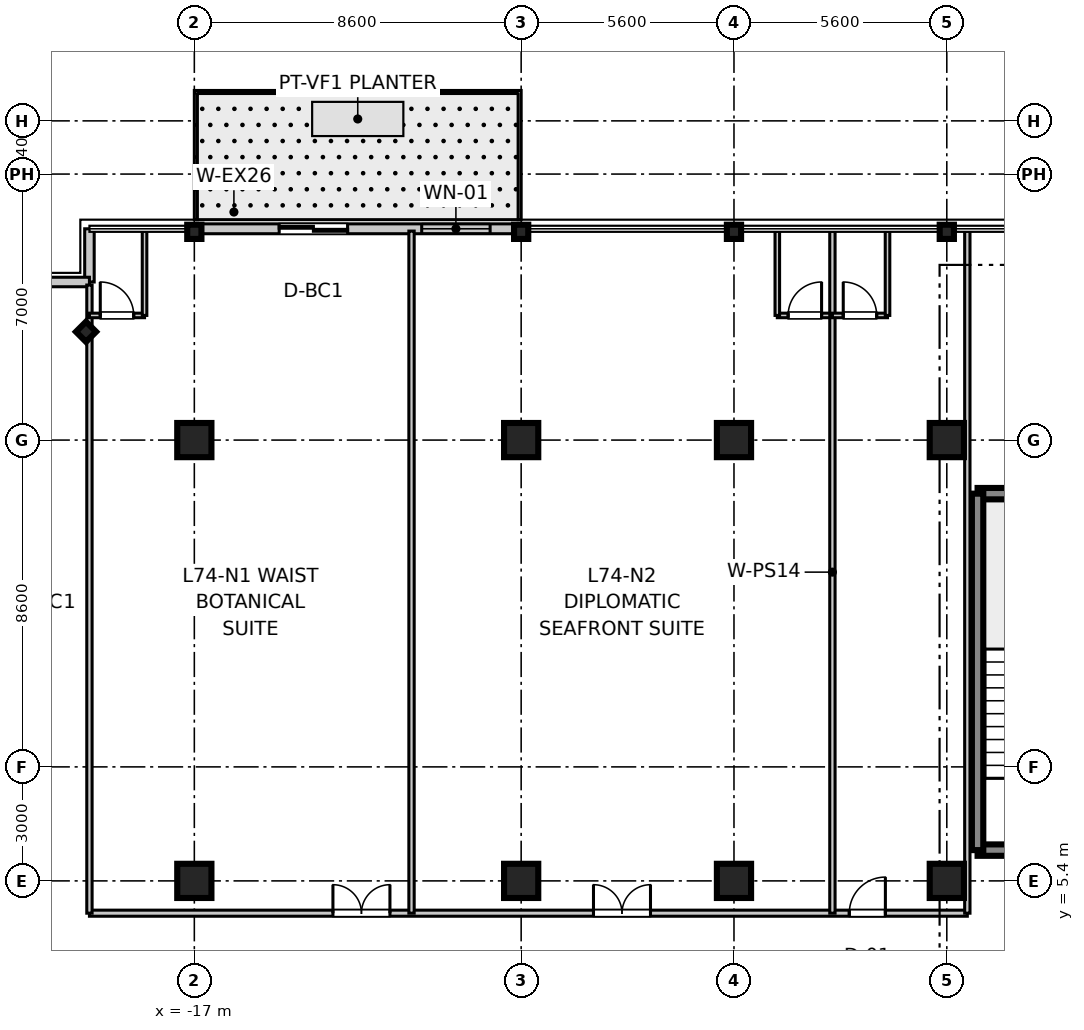
"""IFC4 building model, lengths in metres.
Left out: names, types, materials, properties, quantities, classifications, styles, units other than length and angle.
Written with IfcOpenShell. Run it as: python <this file> out.ifc"""

import sys

from ifc_helpers import new_model, si_unit, direction, frame, frame_2d, origin, origin_2d, place, context, subcontext, project, spatial, rectangle, i_section, extrude, source, transform, mapped, element, fill, save


model = new_model("IFC4")
c1 = context("Model", 3, precision=1e-05, world=origin(), true_north=direction((0.0, 1.0)))
c2 = subcontext(c1, "Body", "Model", "MODEL_VIEW")
j1 = project(units=[si_unit("LENGTHUNIT", "METRE"), si_unit("PLANEANGLEUNIT", "RADIAN")], contexts=[c1])
p1 = place(None, origin())
s1 = spatial("IfcSite", under=j1, at=p1, CompositionType="ELEMENT")
p2 = place(p1, origin())
s2 = spatial("IfcBuilding", under=s1, at=p2, CompositionType="ELEMENT")
p3 = place(p2, frame((0.0, 0.0, 288.8)))
s3 = spatial("IfcBuildingStorey", under=s2, at=p3, CompositionType="ELEMENT", Elevation=288.8)
m1 = source(origin(), c2, "Body", "SweptSolid", [
    extrude(rectangle(XDim=0.9, YDim=0.9, at=origin_2d()), origin(), (0.0, 0.0, 1.0), 3.805),
])
for number, where, z_axis, x_axis in (
    (1, (-17.0, 5.4, 0.0), (0.0, 0.0, 1.0), (1.0, 0.0, 0.0)),
    (2, (-17.0, 17.0, 0.0), (0.0, 0.0, 1.0), (1.0, 0.0, 0.0)),
    (3, (-8.4, 5.4, 0.0), (0.0, 0.0, 1.0), (1.0, 0.0, 0.0)),
    (4, (-8.4, 17.0, 0.0), (0.0, 0.0, 1.0), (1.0, 0.0, 0.0)),
    (5, (-2.8, 5.4, 0.0), (0.0, 0.0, 1.0), (1.0, 0.0, 0.0)),
    (6, (-2.8, 17.0, 0.0), (0.0, 0.0, 1.0), (1.0, 0.0, 0.0)),
    (7, (2.8, 5.4, 0.0), (0.0, 0.0, 1.0), (1.0, 0.0, 0.0)),
    (8, (2.8, 17.0, 0.0), (0.0, 0.0, 1.0), (1.0, 0.0, 0.0)),
):
    element("IfcColumn", number, at=place(p3, frame(where, z_axis=z_axis, x_axis=x_axis)), inside=s3, PredefinedType="COLUMN", context=c2, shape_type="MappedRepresentation", body=[
        mapped(m1, transform((0.0, 0.0, 0.0), scale=1.0)),
    ])
m2 = source(origin(), c2, "Body", "SweptSolid", [
    extrude(i_section(OverallWidth=0.374, OverallDepth=0.374, WebThickness=0.014, FlangeThickness=0.023, at=origin_2d()), origin(), (0.0, 0.0, 1.0), 3.805),
])
for number, where, z_axis, x_axis in (
    (9, (-17.0, 22.48, 0.0), (0.0, 0.0, 1.0), (0.0, 1.0, 0.0)),
    (10, (-8.4, 22.48, 0.0), (0.0, 0.0, 1.0), (0.0, 1.0, 0.0)),
    (11, (-2.8, 22.48, 0.0), (0.0, 0.0, 1.0), (0.0, 1.0, 0.0)),
    (12, (2.8, 22.48, 0.0), (0.0, 0.0, 1.0), (0.0, 1.0, 0.0)),
    (13, (-19.85, 19.85, 0.0), (0.0, 0.0, 1.0), (0.707, 0.707, 0.0)),
):
    element("IfcColumn", number, at=place(p3, frame(where, z_axis=z_axis, x_axis=x_axis)), inside=s3, PredefinedType="COLUMN", context=c2, shape_type="MappedRepresentation", body=[
        mapped(m2, transform((0.0, 0.0, 0.0), scale=1.0)),
    ])
m3 = source(origin(), c2, "Body", "SweptSolid", [
    extrude(rectangle(XDim=3.98, YDim=0.3, at=frame_2d((1.99, 0.0))), origin(), (0.0, 0.0, 1.0), 3.55),
])
for number, where, z_axis, x_axis in (
    (14, (3.61, 6.21, 0.0), (0.0, 0.0, 1.0), (1.0, 0.0, 0.0)),
    (15, (3.61, 15.59, 0.0), (0.0, 0.0, 1.0), (1.0, 0.0, 0.0)),
):
    element("IfcWall", number, at=place(p3, frame(where, z_axis=z_axis, x_axis=x_axis)), inside=s3, PredefinedType="SHEAR", context=c2, shape_type="MappedRepresentation", body=[
        mapped(m3, transform((0.0, 0.0, 0.0), scale=1.0)),
    ])
m4 = source(origin(), c2, "Body", "SweptSolid", [
    extrude(rectangle(XDim=9.38, YDim=0.3, at=frame_2d((4.69, 0.0))), origin(), (0.0, 0.0, 1.0), 3.55),
])
p4 = place(p3, frame((3.61, 6.21, 0.0), z_axis=(0.0, 0.0, 1.0), x_axis=(0.0, 1.0, 0.0)))
e16 = element("IfcWall", 16, at=p4, inside=s3, PredefinedType="SHEAR", context=c2, shape_type="MappedRepresentation", body=[
    mapped(m4, transform((0.0, 0.0, 0.0), scale=1.0)),
])
m5 = source(origin(), c2, "Body", "SweptSolid", [
    extrude(rectangle(XDim=1.4, YDim=0.25, at=frame_2d((0.7, 0.0))), origin(), (0.0, 0.0, 1.0), 3.55),
])
p5 = place(p3, frame((-19.76, 21.16, 0.0), z_axis=(0.0, 0.0, 1.0), x_axis=(0.0, 1.0, 0.0)))
e17 = element("IfcWall", 17, at=p5, inside=s3, PredefinedType="STANDARD", context=c2, shape_type="MappedRepresentation", body=[
    mapped(m5, transform((0.0, 0.0, 0.0), scale=1.0)),
])
m6 = source(origin(), c2, "Body", "SweptSolid", [
    extrude(rectangle(XDim=1.4, YDim=0.25, at=frame_2d((0.7, 0.0))), origin(), (0.0, 0.0, 1.0), 3.55),
])
p6 = place(p3, frame((-21.16, 21.16, 0.0), z_axis=(0.0, 0.0, 1.0), x_axis=(1.0, 0.0, 0.0)))
e18 = element("IfcWall", 18, at=p6, inside=s3, PredefinedType="STANDARD", context=c2, shape_type="MappedRepresentation", body=[
    mapped(m6, transform((0.0, 0.0, 0.0), scale=1.0)),
])
m7 = source(origin(), c2, "Body", "SweptSolid", [
    extrude(rectangle(XDim=8.6, YDim=0.26, at=frame_2d((4.3, 0.0))), origin(), (0.0, 0.0, 1.0), 3.03),
])
p7 = place(p3, frame((-17.0, 22.56, 0.0), z_axis=(0.0, 0.0, 1.0), x_axis=(1.0, 0.0, 0.0)))
e19 = element("IfcWall", 19, at=p7, inside=s3, PredefinedType="STANDARD", context=c2, shape_type="MappedRepresentation", body=[
    mapped(m7, transform((0.0, 0.0, 0.0), scale=1.0)),
])
p8 = place(p7, frame((2.233, 0.0, 0.0)))
e20 = element("IfcOpeningElement", 20, at=p8, cuts=e19, PredefinedType="OPENING", context=c2, shape_type="SweptSolid", body=[
    extrude(rectangle(XDim=1.8, YDim=2.25, at=frame_2d((0.9, 1.125))), frame((0.0, 0.14, 0.0), z_axis=(0.0, -1.0, 0.0), x_axis=(1.0, 0.0, 0.0)), (0.0, 0.0, 1.0), 0.28),
])
p9 = place(p7, frame((5.983, 0.0, 0.85)))
e21 = element("IfcOpeningElement", 21, at=p9, cuts=e19, PredefinedType="OPENING", context=c2, shape_type="SweptSolid", body=[
    extrude(rectangle(XDim=1.8, YDim=1.5, at=frame_2d((0.9, 0.75))), frame((0.0, 0.14, 0.0), z_axis=(0.0, -1.0, 0.0), x_axis=(1.0, 0.0, 0.0)), (0.0, 0.0, 1.0), 0.28),
])
m8 = source(origin(), c2, "Body", "SweptSolid", [
    extrude(rectangle(XDim=23.1, YDim=0.16, at=frame_2d((11.55, 0.0))), origin(), (0.0, 0.0, 1.0), 2.89),
])
p10 = place(p3, frame((-19.76, 4.55, 0.0), z_axis=(0.0, 0.0, 1.0), x_axis=(1.0, 0.0, 0.0)))
e22 = element("IfcWall", 22, at=p10, inside=s3, PredefinedType="PARTITIONING", context=c2, shape_type="MappedRepresentation", body=[
    mapped(m8, transform((0.0, 0.0, 0.0), scale=1.0)),
])
p11 = place(p10, frame((6.407, 0.0, 0.0)))
e23 = element("IfcOpeningElement", 23, at=p11, cuts=e22, PredefinedType="OPENING", context=c2, shape_type="SweptSolid", body=[
    extrude(rectangle(XDim=1.5, YDim=2.15, at=frame_2d((0.75, 1.075))), frame((0.0, 0.09, 0.0), z_axis=(0.0, -1.0, 0.0), x_axis=(1.0, 0.0, 0.0)), (0.0, 0.0, 1.0), 0.18),
])
p12 = place(p10, frame((13.263, 0.0, 0.0)))
e24 = element("IfcOpeningElement", 24, at=p12, cuts=e22, PredefinedType="OPENING", context=c2, shape_type="SweptSolid", body=[
    extrude(rectangle(XDim=1.5, YDim=2.15, at=frame_2d((0.75, 1.075))), frame((0.0, 0.09, 0.0), z_axis=(0.0, -1.0, 0.0), x_axis=(1.0, 0.0, 0.0)), (0.0, 0.0, 1.0), 0.18),
])
p13 = place(p10, frame((19.994, 0.0, 0.0)))
e25 = element("IfcOpeningElement", 25, at=p13, cuts=e22, PredefinedType="OPENING", context=c2, shape_type="SweptSolid", body=[
    extrude(rectangle(XDim=0.95, YDim=2.1, at=frame_2d((0.475, 1.05))), frame((0.0, 0.09, 0.0), z_axis=(0.0, -1.0, 0.0), x_axis=(1.0, 0.0, 0.0)), (0.0, 0.0, 1.0), 0.18),
])
m9 = source(origin(), c2, "Body", "SweptSolid", [
    extrude(rectangle(XDim=16.53, YDim=0.14, at=frame_2d((8.265, 0.0))), origin(), (0.0, 0.0, 1.0), 2.89),
])
p14 = place(p3, frame((-19.76, 4.55, 0.0), z_axis=(0.0, 0.0, 1.0), x_axis=(0.0, 1.0, 0.0)))
e26 = element("IfcWall", 26, at=p14, inside=s3, PredefinedType="PARTITIONING", context=c2, shape_type="MappedRepresentation", body=[
    mapped(m9, transform((0.0, 0.0, 0.0), scale=1.0)),
])
m10 = source(origin(), c2, "Body", "SweptSolid", [
    extrude(rectangle(XDim=17.95, YDim=0.14, at=frame_2d((8.975, 0.0))), origin(), (0.0, 0.0, 1.0), 2.89),
])
p15 = place(p3, frame((3.34, 4.55, 0.0), z_axis=(0.0, 0.0, 1.0), x_axis=(0.0, 1.0, 0.0)))
e27 = element("IfcWall", 27, at=p15, inside=s3, PredefinedType="PARTITIONING", context=c2, shape_type="MappedRepresentation", body=[
    mapped(m10, transform((0.0, 0.0, 0.0), scale=1.0)),
])
m11 = source(origin(), c2, "Body", "SweptSolid", [
    extrude(rectangle(XDim=1.45, YDim=0.12, at=frame_2d((0.725, 0.0))), origin(), (0.0, 0.0, 1.0), 2.89),
])
p16 = place(p3, frame((-19.76, 20.28, 0.0), z_axis=(0.0, 0.0, 1.0), x_axis=(1.0, 0.0, 0.0)))
e28 = element("IfcWall", 28, at=p16, inside=s3, PredefinedType="PARTITIONING", context=c2, shape_type="MappedRepresentation", body=[
    mapped(m11, transform((0.0, 0.0, 0.0), scale=1.0)),
])
p17 = place(p16, frame((0.285, 0.0, 0.0)))
e29 = element("IfcOpeningElement", 29, at=p17, cuts=e28, PredefinedType="OPENING", context=c2, shape_type="SweptSolid", body=[
    extrude(rectangle(XDim=0.88, YDim=2.1, at=frame_2d((0.44, 1.05))), frame((0.0, 0.07, 0.0), z_axis=(0.0, -1.0, 0.0), x_axis=(1.0, 0.0, 0.0)), (0.0, 0.0, 1.0), 0.14),
])
m12 = source(origin(), c2, "Body", "SweptSolid", [
    extrude(rectangle(XDim=2.22, YDim=0.12, at=frame_2d((1.11, 0.0))), origin(), (0.0, 0.0, 1.0), 2.89),
])
p18 = place(p3, frame((-18.31, 20.28, 0.0), z_axis=(0.0, 0.0, 1.0), x_axis=(0.0, 1.0, 0.0)))
e30 = element("IfcWall", 30, at=p18, inside=s3, PredefinedType="PARTITIONING", context=c2, shape_type="MappedRepresentation", body=[
    mapped(m12, transform((0.0, 0.0, 0.0), scale=1.0)),
])
p19 = place(p3, frame((-11.285, 4.55, 0.0), z_axis=(0.0, 0.0, 1.0), x_axis=(0.0, 1.0, 0.0)))
e31 = element("IfcWall", 31, at=p19, inside=s3, PredefinedType="PARTITIONING", context=c2, shape_type="MappedRepresentation", body=[
    mapped(m10, transform((0.0, 0.0, 0.0), scale=1.0)),
])
p20 = place(p3, frame((-1.66, 20.28, 0.0), z_axis=(0.0, 0.0, 1.0), x_axis=(1.0, 0.0, 0.0)))
e32 = element("IfcWall", 32, at=p20, inside=s3, PredefinedType="PARTITIONING", context=c2, shape_type="MappedRepresentation", body=[
    mapped(m11, transform((0.0, 0.0, 0.0), scale=1.0)),
])
p21 = place(p20, frame((0.285, 0.0, 0.0)))
e33 = element("IfcOpeningElement", 33, at=p21, cuts=e32, PredefinedType="OPENING", context=c2, shape_type="SweptSolid", body=[
    extrude(rectangle(XDim=0.88, YDim=2.1, at=frame_2d((0.44, 1.05))), frame((0.0, 0.07, 0.0), z_axis=(0.0, -1.0, 0.0), x_axis=(1.0, 0.0, 0.0)), (0.0, 0.0, 1.0), 0.14),
])
p22 = place(p3, frame((-1.66, 20.28, 0.0), z_axis=(0.0, 0.0, 1.0), x_axis=(0.0, 1.0, 0.0)))
e34 = element("IfcWall", 34, at=p22, inside=s3, PredefinedType="PARTITIONING", context=c2, shape_type="MappedRepresentation", body=[
    mapped(m12, transform((0.0, 0.0, 0.0), scale=1.0)),
])
p23 = place(p3, frame((-0.21, 4.55, 0.0), z_axis=(0.0, 0.0, 1.0), x_axis=(0.0, 1.0, 0.0)))
e35 = element("IfcWall", 35, at=p23, inside=s3, PredefinedType="PARTITIONING", context=c2, shape_type="MappedRepresentation", body=[
    mapped(m10, transform((0.0, 0.0, 0.0), scale=1.0)),
])
p24 = place(p3, frame((-0.21, 20.28, 0.0), z_axis=(0.0, 0.0, 1.0), x_axis=(1.0, 0.0, 0.0)))
e36 = element("IfcWall", 36, at=p24, inside=s3, PredefinedType="PARTITIONING", context=c2, shape_type="MappedRepresentation", body=[
    mapped(m11, transform((0.0, 0.0, 0.0), scale=1.0)),
])
p25 = place(p24, frame((0.285, 0.0, 0.0)))
e37 = element("IfcOpeningElement", 37, at=p25, cuts=e36, PredefinedType="OPENING", context=c2, shape_type="SweptSolid", body=[
    extrude(rectangle(XDim=0.88, YDim=2.1, at=frame_2d((0.44, 1.05))), frame((0.0, 0.07, 0.0), z_axis=(0.0, -1.0, 0.0), x_axis=(1.0, 0.0, 0.0)), (0.0, 0.0, 1.0), 0.14),
])
p26 = place(p3, frame((1.24, 20.28, 0.0), z_axis=(0.0, 0.0, 1.0), x_axis=(0.0, 1.0, 0.0)))
e38 = element("IfcWall", 38, at=p26, inside=s3, PredefinedType="PARTITIONING", context=c2, shape_type="MappedRepresentation", body=[
    mapped(m12, transform((0.0, 0.0, 0.0), scale=1.0)),
])
m13 = source(origin(), c2, "Body", "SweptSolid", [
    extrude(rectangle(XDim=0.88, YDim=2.1, at=frame_2d((0.44, 1.05))), frame((0.0, 0.025, 0.0), z_axis=(0.0, -1.0, 0.0), x_axis=(1.0, 0.0, 0.0)), (0.0, 0.0, 1.0), 0.05),
])
p27 = place(p17, origin())
e39 = element("IfcDoor", 39, at=p27, inside=s3, OperationType="SINGLE_SWING_LEFT", PredefinedType="DOOR", context=c2, shape_type="MappedRepresentation", body=[
    mapped(m13, transform((0.0, 0.0, 0.0), scale=1.0)),
])
fill(e29, e39)
m14 = source(origin(), c2, "Body", "SweptSolid", [
    extrude(rectangle(XDim=1.5, YDim=2.15, at=frame_2d((0.75, 1.075))), frame((0.0, 0.025, 0.0), z_axis=(0.0, -1.0, 0.0), x_axis=(1.0, 0.0, 0.0)), (0.0, 0.0, 1.0), 0.05),
])
p28 = place(p11, origin())
e40 = element("IfcDoor", 40, at=p28, inside=s3, OperationType="DOUBLE_DOOR_SINGLE_SWING", PredefinedType="DOOR", context=c2, shape_type="MappedRepresentation", body=[
    mapped(m14, transform((0.0, 0.0, 0.0), scale=1.0)),
])
fill(e23, e40)
p29 = place(p21, origin())
e41 = element("IfcDoor", 41, at=p29, inside=s3, OperationType="SINGLE_SWING_RIGHT", PredefinedType="DOOR", context=c2, shape_type="MappedRepresentation", body=[
    mapped(m13, transform((0.0, 0.0, 0.0), scale=1.0)),
])
fill(e33, e41)
p30 = place(p12, origin())
e42 = element("IfcDoor", 42, at=p30, inside=s3, OperationType="DOUBLE_DOOR_SINGLE_SWING", PredefinedType="DOOR", context=c2, shape_type="MappedRepresentation", body=[
    mapped(m14, transform((0.0, 0.0, 0.0), scale=1.0)),
])
fill(e24, e42)
p31 = place(p25, origin())
e43 = element("IfcDoor", 43, at=p31, inside=s3, OperationType="SINGLE_SWING_LEFT", PredefinedType="DOOR", context=c2, shape_type="MappedRepresentation", body=[
    mapped(m13, transform((0.0, 0.0, 0.0), scale=1.0)),
])
fill(e37, e43)
m15 = source(origin(), c2, "Body", "SweptSolid", [
    extrude(rectangle(XDim=0.95, YDim=2.1, at=frame_2d((0.475, 1.05))), frame((0.0, 0.025, 0.0), z_axis=(0.0, -1.0, 0.0), x_axis=(1.0, 0.0, 0.0)), (0.0, 0.0, 1.0), 0.05),
])
p32 = place(p13, origin())
e44 = element("IfcDoor", 44, at=p32, inside=s3, OperationType="SINGLE_SWING_RIGHT", PredefinedType="DOOR", context=c2, shape_type="MappedRepresentation", body=[
    mapped(m15, transform((0.0, 0.0, 0.0), scale=1.0)),
])
fill(e25, e44)
m16 = source(origin(), c2, "Body", "SweptSolid", [
    extrude(rectangle(XDim=1.8, YDim=2.25, at=frame_2d((0.9, 1.125))), frame((0.0, 0.025, 0.0), z_axis=(0.0, -1.0, 0.0), x_axis=(1.0, 0.0, 0.0)), (0.0, 0.0, 1.0), 0.05),
])
p33 = place(p8, origin())
e45 = element("IfcDoor", 45, at=p33, inside=s3, OperationType="DOUBLE_DOOR_SLIDING", PredefinedType="DOOR", context=c2, shape_type="MappedRepresentation", body=[
    mapped(m16, transform((0.0, 0.0, 0.0), scale=1.0)),
])
fill(e20, e45)
m17 = source(origin(), c2, "Body", "SweptSolid", [
    extrude(rectangle(XDim=1.8, YDim=1.5, at=frame_2d((0.9, 0.75))), frame((0.0, 0.03, 0.0), z_axis=(0.0, -1.0, 0.0), x_axis=(1.0, 0.0, 0.0)), (0.0, 0.0, 1.0), 0.06),
])
p34 = place(p9, origin())
e46 = element("IfcWindow", 46, at=p34, inside=s3, PartitioningType="SINGLE_PANEL", PredefinedType="WINDOW", context=c2, shape_type="MappedRepresentation", body=[
    mapped(m17, transform((0.0, 0.0, 0.0), scale=1.0)),
])
fill(e21, e46)
save(model, sys.argv[1])
